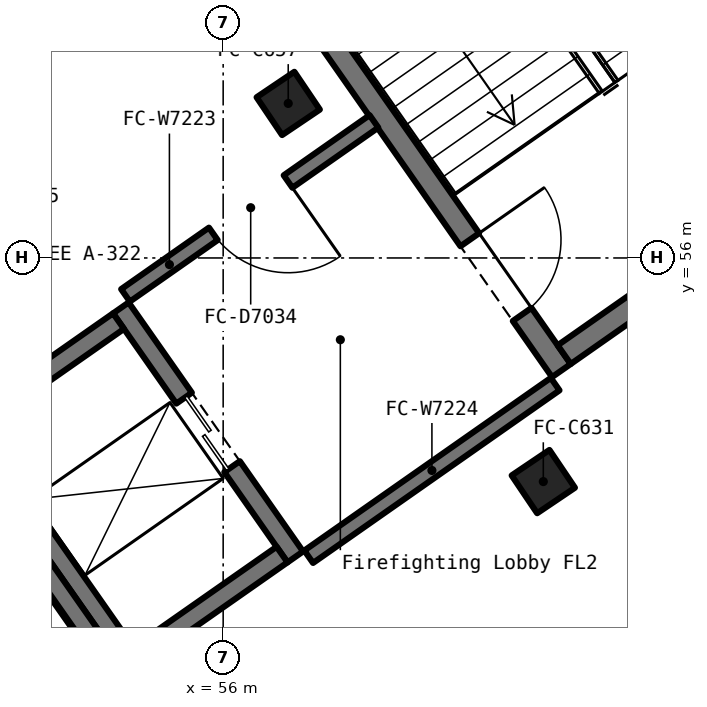
"""IFC4 building model, lengths in metres.
Left out: names, types, materials, properties, quantities, classifications, styles, units other than length and angle.
Written with IfcOpenShell. Run it as: python <this file> out.ifc"""

import sys

from ifc_helpers import new_model, si_unit, direction, frame, frame_2d, origin, origin_2d, place, context, subcontext, project, spatial, rectangle, extrude, element, fill, save


model = new_model("IFC4")
c1 = context("Model", 3, precision=1e-05, world=origin(), true_north=direction((0.0, 1.0)))
c2 = subcontext(c1, "Body", "Model", "MODEL_VIEW")
j1 = project(units=[si_unit("LENGTHUNIT", "METRE"), si_unit("PLANEANGLEUNIT", "RADIAN")], contexts=[c1])
p1 = place(None, origin())
s1 = spatial("IfcSite", under=j1, at=p1, CompositionType="ELEMENT")
p2 = place(p1, origin())
s2 = spatial("IfcBuilding", under=s1, at=p2, CompositionType="ELEMENT")
p3 = place(p2, frame((0.0, 0.0, 11.5)))
s3 = spatial("IfcBuildingStorey", under=s2, at=p3, CompositionType="ELEMENT", Elevation=11.5)
for number, where, z_axis, x_axis in (
    (1, (60.212, 53.058, 0.0), (0.0, 0.0, 1.0), (0.829, 0.559, 0.0)),
    (2, (56.856, 58.033, 0.0), (0.0, 0.0, 1.0), (0.829, 0.559, 0.0)),
):
    element("IfcColumn", number, at=place(p3, frame(where, z_axis=z_axis, x_axis=x_axis)), inside=s3, PredefinedType="COLUMN", context=c2, shape_type="SweptSolid", body=[
        extrude(rectangle(XDim=0.6, YDim=0.6, at=origin_2d()), origin(), (0.0, 0.0, 1.0), 5.5),
    ])
p4 = place(p3, frame((64.791, 57.559, 0.0), z_axis=(0.0, 0.0, 1.0), x_axis=(-0.573514776444, 0.819195215563, 0.0)))
e3 = element("IfcWall", 3, at=p4, inside=s3, PredefinedType="SOLIDWALL", context=c2, shape_type="SweptSolid", body=[
    extrude(rectangle(XDim=10.0, YDim=0.3, at=frame_2d((5.0, 0.0))), origin(), (0.0, 0.0, 1.0), 5.5),
])
p5 = place(p3, frame((54.714, 62.711, 0.0), z_axis=(0.0, 0.0, 1.0), x_axis=(0.573563925118, -0.819160804606, 0.0)))
e4 = element("IfcWall", 4, at=p5, inside=s3, PredefinedType="SOLIDWALL", context=c2, shape_type="SweptSolid", body=[
    extrude(rectangle(XDim=10.0, YDim=0.3, at=frame_2d((5.0, 0.0))), origin(), (0.0, 0.0, 1.0), 5.5),
])
p6 = place(p5, frame((7.9, 0.0, 0.0)))
e5 = element("IfcOpeningElement", 5, at=p6, cuts=e4, PredefinedType="OPENING", context=c2, shape_type="SweptSolid", body=[
    extrude(rectangle(XDim=1.2, YDim=2.1, at=frame_2d((0.6, 1.05))), frame((0.0, 0.162, 0.0), z_axis=(0.0, -1.0, 0.0), x_axis=(1.0, 0.0, 0.0)), (0.0, 0.0, 1.0), 0.324),
])
p7 = place(p3, frame((60.487, 54.728, 0.0), z_axis=(0.0, 0.0, 1.0), x_axis=(0.819096538389, 0.573655698829, 0.0)))
e6 = element("IfcWall", 6, at=p7, inside=s3, PredefinedType="SOLIDWALL", context=c2, shape_type="SweptSolid", body=[
    extrude(rectangle(XDim=4.999, YDim=0.3, at=frame_2d((2.5, 0.0))), origin(), (0.0, 0.0, 1.0), 5.5),
])
p8 = place(p3, frame((56.949, 52.067, 0.0), z_axis=(0.0, 0.0, 1.0), x_axis=(-0.573736768582, 0.819039755065, 0.0)))
e7 = element("IfcWall", 7, at=p8, inside=s3, PredefinedType="SOLIDWALL", context=c2, shape_type="SweptSolid", body=[
    extrude(rectangle(XDim=4.0, YDim=0.25, at=frame_2d((2.0, 0.0))), origin(), (0.0, 0.0, 1.0), 5.5),
])
p9 = place(p8, frame((1.45, 0.0, 0.0)))
e8 = element("IfcOpeningElement", 8, at=p9, cuts=e7, PredefinedType="OPENING", context=c2, shape_type="SweptSolid", body=[
    extrude(rectangle(XDim=1.1, YDim=2.1, at=frame_2d((0.55, 1.05))), frame((0.0, 0.137, 0.0), z_axis=(0.0, -1.0, 0.0), x_axis=(1.0, 0.0, 0.0)), (0.0, 0.0, 1.0), 0.274),
])
p10 = place(p3, frame((54.623, 55.169, 0.0), z_axis=(0.0, 0.0, 1.0), x_axis=(-0.819226933165, -0.573469469089, 0.0)))
e9 = element("IfcWall", 9, at=p10, inside=s3, PredefinedType="SOLIDWALL", context=c2, shape_type="SweptSolid", body=[
    extrude(rectangle(XDim=2.3, YDim=0.25, at=frame_2d((1.15, 0.0))), origin(), (0.0, 0.0, 1.0), 5.5),
])
p11 = place(p3, frame((52.565, 53.881, 0.0), z_axis=(0.0, 0.0, 1.0), x_axis=(0.573572956461, -0.819154480923, 0.0)))
e10 = element("IfcWall", 10, at=p11, inside=s3, PredefinedType="SOLIDWALL", context=c2, shape_type="SweptSolid", body=[
    extrude(rectangle(XDim=4.0, YDim=0.25, at=frame_2d((2.0, 0.0))), origin(), (0.0, 0.0, 1.0), 5.5),
])
p12 = place(p3, frame((54.89, 50.779, 0.0), z_axis=(0.0, 0.0, 1.0), x_axis=(0.819366508838, 0.573270027295, 0.0)))
e11 = element("IfcWall", 11, at=p12, inside=s3, PredefinedType="SOLIDWALL", context=c2, shape_type="SweptSolid", body=[
    extrude(rectangle(XDim=2.301, YDim=0.25, at=frame_2d((1.15, 0.0))), origin(), (0.0, 0.0, 1.0), 5.5),
])
p13 = place(p3, frame((54.655, 50.461, 0.0), z_axis=(0.0, 0.0, 1.0), x_axis=(-0.573572956461, 0.819154480923, 0.0)))
e12 = element("IfcWall", 12, at=p13, inside=s3, PredefinedType="SOLIDWALL", context=c2, shape_type="SweptSolid", body=[
    extrude(rectangle(XDim=4.0, YDim=0.25, at=frame_2d((2.0, 0.0))), origin(), (0.0, 0.0, 1.0), 5.5),
])
p14 = place(p3, frame((57.984, 57.797, 0.0), z_axis=(0.0, 0.0, 1.0), x_axis=(-0.819125561737, -0.573614255497, 0.0)))
e13 = element("IfcWall", 13, at=p14, inside=s3, PredefinedType="PARTITIONING", context=c2, shape_type="SweptSolid", body=[
    extrude(rectangle(XDim=3.99, YDim=0.2, at=frame_2d((1.995, 0.0))), origin(), (0.0, 0.0, 1.0), 5.28),
])
p15 = place(p14, frame((1.38, 0.0, 0.0)))
e14 = element("IfcOpeningElement", 14, at=p15, cuts=e13, PredefinedType="OPENING", context=c2, shape_type="SweptSolid", body=[
    extrude(rectangle(XDim=1.2, YDim=2.1, at=frame_2d((0.6, 1.05))), frame((0.0, 0.112, 0.0), z_axis=(0.0, -1.0, 0.0), x_axis=(1.0, 0.0, 0.0)), (0.0, 0.0, 1.0), 0.224),
])
p16 = place(p3, frame((57.125, 52.069, 0.0), z_axis=(0.0, 0.0, 1.0), x_axis=(0.81911891796, 0.573623742744, 0.0)))
e15 = element("IfcWall", 15, at=p16, inside=s3, PredefinedType="PARTITIONING", context=c2, shape_type="SweptSolid", body=[
    extrude(rectangle(XDim=3.959, YDim=0.2, at=frame_2d((1.979, 0.0))), origin(), (0.0, 0.0, 1.0), 5.28),
])
p17 = place(p6, origin())
e16 = element("IfcDoor", 16, at=p17, inside=s3, OperationType="SINGLE_SWING_LEFT", PredefinedType="DOOR", context=c2, shape_type="SweptSolid", body=[
    extrude(rectangle(XDim=1.2, YDim=2.1, at=frame_2d((0.6, 1.05))), frame((0.0, 0.025, 0.0), z_axis=(0.0, -1.0, 0.0), x_axis=(1.0, 0.0, 0.0)), (0.0, 0.0, 1.0), 0.05),
])
fill(e5, e16)
p18 = place(p9, origin())
e17 = element("IfcDoor", 17, at=p18, inside=s3, OperationType="DOUBLE_DOOR_SLIDING", PredefinedType="DOOR", context=c2, shape_type="SweptSolid", body=[
    extrude(rectangle(XDim=1.1, YDim=2.1, at=frame_2d((0.55, 1.05))), frame((0.0, 0.025, 0.0), z_axis=(0.0, -1.0, 0.0), x_axis=(1.0, 0.0, 0.0)), (0.0, 0.0, 1.0), 0.05),
])
fill(e8, e17)
p19 = place(p15, origin())
e18 = element("IfcDoor", 18, at=p19, inside=s3, OperationType="SINGLE_SWING_LEFT", PredefinedType="DOOR", context=c2, shape_type="SweptSolid", body=[
    extrude(rectangle(XDim=1.2, YDim=2.1, at=frame_2d((0.6, 1.05))), frame((0.0, 0.025, 0.0), z_axis=(0.0, -1.0, 0.0), x_axis=(1.0, 0.0, 0.0)), (0.0, 0.0, 1.0), 0.05),
])
fill(e14, e18)
save(model, sys.argv[1])
